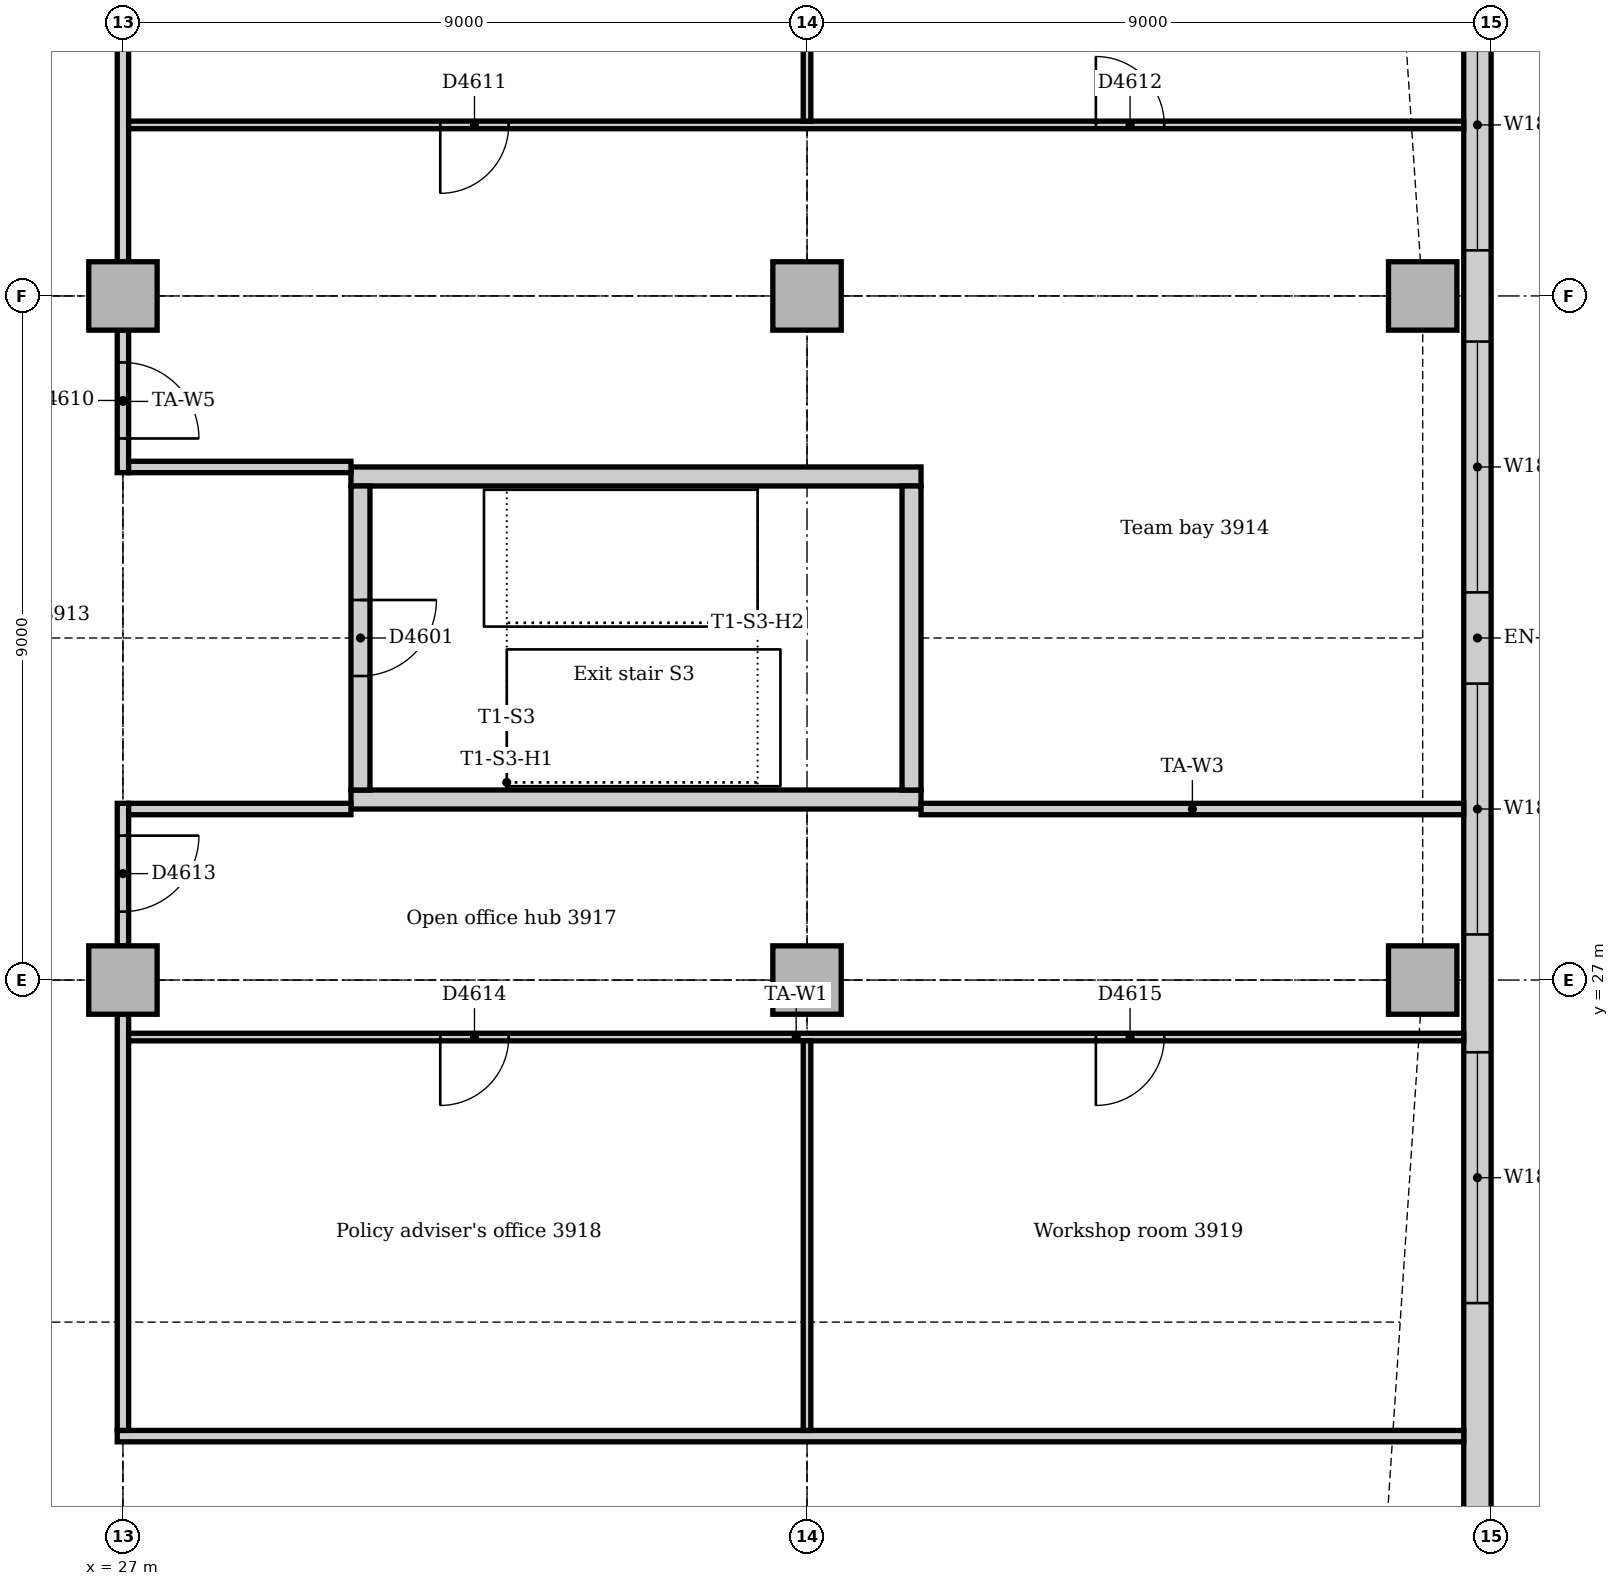
"""IFC4 building model, lengths in metres.
Left out: names, types, materials, properties, quantities, classifications, styles, units other than length and angle.
Written with IfcOpenShell. Run it as: python <this file> out.ifc"""

import sys

from ifc_helpers import new_model, si_unit, direction, frame, frame_2d, origin, origin_2d, place, context, subcontext, project, spatial, rectangle, extrude, element, fill, save


model = new_model("IFC4")
c1 = context("Model", 3, precision=1e-05, world=origin(), true_north=direction((0.0, 1.0)))
c2 = subcontext(c1, "Body", "Model", "MODEL_VIEW")
j1 = project(units=[si_unit("LENGTHUNIT", "METRE"), si_unit("PLANEANGLEUNIT", "RADIAN")], contexts=[c1])
p1 = place(None, origin())
s1 = spatial("IfcSite", under=j1, at=p1, CompositionType="ELEMENT")
p2 = place(p1, origin())
s2 = spatial("IfcBuilding", under=s1, at=p2, CompositionType="ELEMENT")
p3 = place(p2, frame((0.0, 0.0, 165.0)))
s3 = spatial("IfcBuildingStorey", under=s2, at=p3, CompositionType="ELEMENT", Elevation=165.0)
for number, where, z_axis, x_axis in (
    (1, (30.0, 29.375, 0.0), (0.0, 0.0, 1.0), (1.0, 0.0, 0.0)),
    (2, (37.5, 33.625, 0.0), (0.0, 0.0, 1.0), (-1.0, 0.0, 0.0)),
):
    element("IfcWall", number, at=place(p3, frame(where, z_axis=z_axis, x_axis=x_axis)), inside=s3, PredefinedType="SOLIDWALL", context=c2, shape_type="SweptSolid", body=[
        extrude(rectangle(XDim=7.5, YDim=0.25, at=frame_2d((3.75, 0.0))), origin(), (0.0, 0.0, 1.0), 4.0),
    ])
p4 = place(p3, frame((37.375, 29.5, 0.0), z_axis=(0.0, 0.0, 1.0), x_axis=(0.0, 1.0, 0.0)))
e3 = element("IfcWall", 3, at=p4, inside=s3, PredefinedType="SOLIDWALL", context=c2, shape_type="SweptSolid", body=[
    extrude(rectangle(XDim=4.0, YDim=0.25, at=frame_2d((2.0, 0.0))), origin(), (0.0, 0.0, 1.0), 4.0),
])
p5 = place(p3, frame((30.125, 33.5, 0.0), z_axis=(0.0, 0.0, 1.0), x_axis=(0.0, -1.0, 0.0)))
e4 = element("IfcWall", 4, at=p5, inside=s3, PredefinedType="SOLIDWALL", context=c2, shape_type="SweptSolid", body=[
    extrude(rectangle(XDim=4.0, YDim=0.25, at=frame_2d((2.0, 0.0))), origin(), (0.0, 0.0, 1.0), 4.0),
])
p6 = place(p5, frame((1.5, 0.0, 0.0)))
e5 = element("IfcOpeningElement", 5, at=p6, cuts=e4, PredefinedType="OPENING", context=c2, shape_type="SweptSolid", body=[
    extrude(rectangle(XDim=1.0, YDim=2.1, at=frame_2d((0.5, 1.05))), frame((0.0, 0.135, 0.0), z_axis=(0.0, -1.0, 0.0), x_axis=(1.0, 0.0, 0.0)), (0.0, 0.0, 1.0), 0.27),
])
for number, where, z_axis, x_axis in (
    (6, (44.1, 27.0, 0.0), (0.0, 0.0, 1.0), (1.0, 0.0, 0.0)),
    (7, (44.1, 36.0, 0.0), (0.0, 0.0, 1.0), (1.0, 0.0, 0.0)),
    (8, (27.0, 27.0, 0.0), (0.0, 0.0, 1.0), (1.0, 0.0, 0.0)),
    (9, (27.0, 36.0, 0.0), (0.0, 0.0, 1.0), (1.0, 0.0, 0.0)),
    (10, (36.0, 27.0, 0.0), (0.0, 0.0, 1.0), (1.0, 0.0, 0.0)),
    (11, (36.0, 36.0, 0.0), (0.0, 0.0, 1.0), (1.0, 0.0, 0.0)),
):
    element("IfcColumn", number, at=place(p3, frame(where, z_axis=z_axis, x_axis=x_axis)), inside=s3, PredefinedType="COLUMN", context=c2, shape_type="SweptSolid", body=[
        extrude(rectangle(XDim=0.9, YDim=0.9, at=origin_2d()), origin(), (0.0, 0.0, 1.0), 3.85),
    ])
p7 = place(p3, frame((44.82, 19.243, 0.0), z_axis=(0.0, 0.0, 1.0), x_axis=(0.0, 1.0, 0.0)))
e12 = element("IfcWall", 12, at=p7, inside=s3, PredefinedType="STANDARD", context=c2, shape_type="SweptSolid", body=[
    extrude(rectangle(XDim=24.515, YDim=0.36, at=frame_2d((12.257, 0.0))), origin(), (0.0, 0.0, 1.0), 3.85),
])
p8 = place(p7, frame((3.507, 0.0, 0.9)))
e13 = element("IfcOpeningElement", 13, at=p8, cuts=e12, PredefinedType="OPENING", context=c2, shape_type="SweptSolid", body=[
    extrude(rectangle(XDim=3.3, YDim=1.6, at=frame_2d((1.65, 0.8))), frame((0.0, 0.19, 0.0), z_axis=(0.0, -1.0, 0.0), x_axis=(1.0, 0.0, 0.0)), (0.0, 0.0, 1.0), 0.38),
])
p9 = place(p7, frame((8.357, 0.0, 0.9)))
e14 = element("IfcOpeningElement", 14, at=p9, cuts=e12, PredefinedType="OPENING", context=c2, shape_type="SweptSolid", body=[
    extrude(rectangle(XDim=3.3, YDim=1.6, at=frame_2d((1.65, 0.8))), frame((0.0, 0.19, 0.0), z_axis=(0.0, -1.0, 0.0), x_axis=(1.0, 0.0, 0.0)), (0.0, 0.0, 1.0), 0.38),
])
p10 = place(p7, frame((12.857, 0.0, 0.9)))
e15 = element("IfcOpeningElement", 15, at=p10, cuts=e12, PredefinedType="OPENING", context=c2, shape_type="SweptSolid", body=[
    extrude(rectangle(XDim=3.3, YDim=1.6, at=frame_2d((1.65, 0.8))), frame((0.0, 0.19, 0.0), z_axis=(0.0, -1.0, 0.0), x_axis=(1.0, 0.0, 0.0)), (0.0, 0.0, 1.0), 0.38),
])
p11 = place(p7, frame((17.357, 0.0, 0.9)))
e16 = element("IfcOpeningElement", 16, at=p11, cuts=e12, PredefinedType="OPENING", context=c2, shape_type="SweptSolid", body=[
    extrude(rectangle(XDim=3.3, YDim=1.6, at=frame_2d((1.65, 0.8))), frame((0.0, 0.19, 0.0), z_axis=(0.0, -1.0, 0.0), x_axis=(1.0, 0.0, 0.0)), (0.0, 0.0, 1.0), 0.38),
])
p12 = place(p3, frame((26.925, 21.0, 0.0), z_axis=(0.0, 0.0, 1.0), x_axis=(1.0, 0.0, 0.0)))
e17 = element("IfcWall", 17, at=p12, inside=s3, PredefinedType="PARTITIONING", context=c2, shape_type="SweptSolid", body=[
    extrude(rectangle(XDim=17.715, YDim=0.15, at=frame_2d((8.857, 0.0))), origin(), (0.0, 0.0, 1.0), 3.85),
])
p13 = place(p3, frame((27.0, 33.675, 0.0), z_axis=(0.0, 0.0, 1.0), x_axis=(0.0, 1.0, 0.0)))
e18 = element("IfcWall", 18, at=p13, inside=s3, PredefinedType="PARTITIONING", context=c2, shape_type="SweptSolid", body=[
    extrude(rectangle(XDim=1.875, YDim=0.15, at=frame_2d((0.938, 0.0))), origin(), (0.0, 0.0, 1.0), 3.362),
])
p14 = place(p13, frame((0.45, 0.0, 0.0)))
e19 = element("IfcOpeningElement", 19, at=p14, cuts=e18, PredefinedType="OPENING", context=c2, shape_type="SweptSolid", body=[
    extrude(rectangle(XDim=1.0, YDim=2.1, at=frame_2d((0.5, 1.05))), frame((0.0, 0.085, 0.0), z_axis=(0.0, -1.0, 0.0), x_axis=(1.0, 0.0, 0.0)), (0.0, 0.0, 1.0), 0.17),
])
p15 = place(p3, frame((27.0, 36.45, 0.0), z_axis=(0.0, 0.0, 1.0), x_axis=(0.0, 1.0, 0.0)))
e20 = element("IfcWall", 20, at=p15, inside=s3, PredefinedType="PARTITIONING", context=c2, shape_type="SweptSolid", body=[
    extrude(rectangle(XDim=7.2, YDim=0.15, at=frame_2d((3.6, 0.0))), origin(), (0.0, 0.0, 1.0), 3.362),
])
p16 = place(p3, frame((27.0, 21.075, 0.0), z_axis=(0.0, 0.0, 1.0), x_axis=(0.0, 1.0, 0.0)))
e21 = element("IfcWall", 21, at=p16, inside=s3, PredefinedType="PARTITIONING", context=c2, shape_type="SweptSolid", body=[
    extrude(rectangle(XDim=5.475, YDim=0.15, at=frame_2d((2.737, 0.0))), origin(), (0.0, 0.0, 1.0), 3.362),
])
p17 = place(p3, frame((27.0, 27.45, 0.0), z_axis=(0.0, 0.0, 1.0), x_axis=(0.0, 1.0, 0.0)))
e22 = element("IfcWall", 22, at=p17, inside=s3, PredefinedType="PARTITIONING", context=c2, shape_type="SweptSolid", body=[
    extrude(rectangle(XDim=1.875, YDim=0.15, at=frame_2d((0.938, 0.0))), origin(), (0.0, 0.0, 1.0), 3.362),
])
p18 = place(p17, frame((0.45, 0.0, 0.0)))
e23 = element("IfcOpeningElement", 23, at=p18, cuts=e22, PredefinedType="OPENING", context=c2, shape_type="SweptSolid", body=[
    extrude(rectangle(XDim=1.0, YDim=2.1, at=frame_2d((0.5, 1.05))), frame((0.0, 0.085, 0.0), z_axis=(0.0, -1.0, 0.0), x_axis=(1.0, 0.0, 0.0)), (0.0, 0.0, 1.0), 0.17),
])
for number, where, z_axis, x_axis in (
    (24, (27.075, 29.25, 0.0), (0.0, 0.0, 1.0), (1.0, 0.0, 0.0)),
    (25, (27.075, 33.75, 0.0), (0.0, 0.0, 1.0), (1.0, 0.0, 0.0)),
):
    element("IfcWall", number, at=place(p3, frame(where, z_axis=z_axis, x_axis=x_axis)), inside=s3, PredefinedType="PARTITIONING", context=c2, shape_type="SweptSolid", body=[
        extrude(rectangle(XDim=2.925, YDim=0.15, at=frame_2d((1.462, 0.0))), origin(), (0.0, 0.0, 1.0), 3.85),
    ])
p19 = place(p3, frame((37.5, 29.25, 0.0), z_axis=(0.0, 0.0, 1.0), x_axis=(1.0, 0.0, 0.0)))
e26 = element("IfcWall", 26, at=p19, inside=s3, PredefinedType="PARTITIONING", context=c2, shape_type="SweptSolid", body=[
    extrude(rectangle(XDim=7.14, YDim=0.15, at=frame_2d((3.57, 0.0))), origin(), (0.0, 0.0, 1.0), 3.85),
])
p20 = place(p3, frame((27.075, 26.25, 0.0), z_axis=(0.0, 0.0, 1.0), x_axis=(1.0, 0.0, 0.0)))
e27 = element("IfcWall", 27, at=p20, inside=s3, PredefinedType="PARTITIONING", context=c2, shape_type="SweptSolid", body=[
    extrude(rectangle(XDim=17.565, YDim=0.1, at=frame_2d((8.783, 0.0))), origin(), (0.0, 0.0, 1.0), 3.85),
])
p21 = place(p20, frame((4.1, 0.0, 0.0)))
e28 = element("IfcOpeningElement", 28, at=p21, cuts=e27, PredefinedType="OPENING", context=c2, shape_type="SweptSolid", body=[
    extrude(rectangle(XDim=0.9, YDim=2.1, at=frame_2d((0.45, 1.05))), frame((0.0, 0.06, 0.0), z_axis=(0.0, -1.0, 0.0), x_axis=(1.0, 0.0, 0.0)), (0.0, 0.0, 1.0), 0.12),
])
p22 = place(p20, frame((12.725, 0.0, 0.0)))
e29 = element("IfcOpeningElement", 29, at=p22, cuts=e27, PredefinedType="OPENING", context=c2, shape_type="SweptSolid", body=[
    extrude(rectangle(XDim=0.9, YDim=2.1, at=frame_2d((0.45, 1.05))), frame((0.0, 0.06, 0.0), z_axis=(0.0, -1.0, 0.0), x_axis=(1.0, 0.0, 0.0)), (0.0, 0.0, 1.0), 0.12),
])
p23 = place(p3, frame((27.075, 38.25, 0.0), z_axis=(0.0, 0.0, 1.0), x_axis=(1.0, 0.0, 0.0)))
e30 = element("IfcWall", 30, at=p23, inside=s3, PredefinedType="PARTITIONING", context=c2, shape_type="SweptSolid", body=[
    extrude(rectangle(XDim=17.565, YDim=0.1, at=frame_2d((8.783, 0.0))), origin(), (0.0, 0.0, 1.0), 3.85),
])
p24 = place(p23, frame((4.1, 0.0, 0.0)))
e31 = element("IfcOpeningElement", 31, at=p24, cuts=e30, PredefinedType="OPENING", context=c2, shape_type="SweptSolid", body=[
    extrude(rectangle(XDim=0.9, YDim=2.1, at=frame_2d((0.45, 1.05))), frame((0.0, 0.06, 0.0), z_axis=(0.0, -1.0, 0.0), x_axis=(1.0, 0.0, 0.0)), (0.0, 0.0, 1.0), 0.12),
])
p25 = place(p23, frame((12.725, 0.0, 0.0)))
e32 = element("IfcOpeningElement", 32, at=p25, cuts=e30, PredefinedType="OPENING", context=c2, shape_type="SweptSolid", body=[
    extrude(rectangle(XDim=0.9, YDim=2.1, at=frame_2d((0.45, 1.05))), frame((0.0, 0.06, 0.0), z_axis=(0.0, -1.0, 0.0), x_axis=(1.0, 0.0, 0.0)), (0.0, 0.0, 1.0), 0.12),
])
p26 = place(p3, frame((36.0, 38.3, 0.0), z_axis=(0.0, 0.0, 1.0), x_axis=(0.0, 1.0, 0.0)))
e33 = element("IfcWall", 33, at=p26, inside=s3, PredefinedType="PARTITIONING", context=c2, shape_type="SweptSolid", body=[
    extrude(rectangle(XDim=5.35, YDim=0.1, at=frame_2d((2.675, 0.0))), origin(), (0.0, 0.0, 1.0), 3.362),
])
p27 = place(p3, frame((36.0, 21.075, 0.0), z_axis=(0.0, 0.0, 1.0), x_axis=(0.0, 1.0, 0.0)))
e34 = element("IfcWall", 34, at=p27, inside=s3, PredefinedType="PARTITIONING", context=c2, shape_type="SweptSolid", body=[
    extrude(rectangle(XDim=5.125, YDim=0.1, at=frame_2d((2.562, 0.0))), origin(), (0.0, 0.0, 1.0), 3.362),
])
p28 = place(p8, origin())
e35 = element("IfcWindow", 35, at=p28, inside=s3, PartitioningType="SINGLE_PANEL", PredefinedType="WINDOW", context=c2, shape_type="SweptSolid", body=[
    extrude(rectangle(XDim=3.3, YDim=1.6, at=frame_2d((1.65, 0.8))), frame((0.0, 0.13, 0.0), z_axis=(0.0, -1.0, 0.0), x_axis=(1.0, 0.0, 0.0)), (0.0, 0.0, 1.0), 0.06),
])
fill(e13, e35)
p29 = place(p9, origin())
e36 = element("IfcWindow", 36, at=p29, inside=s3, PartitioningType="SINGLE_PANEL", PredefinedType="WINDOW", context=c2, shape_type="SweptSolid", body=[
    extrude(rectangle(XDim=3.3, YDim=1.6, at=frame_2d((1.65, 0.8))), frame((0.0, 0.13, 0.0), z_axis=(0.0, -1.0, 0.0), x_axis=(1.0, 0.0, 0.0)), (0.0, 0.0, 1.0), 0.06),
])
fill(e14, e36)
p30 = place(p10, origin())
e37 = element("IfcWindow", 37, at=p30, inside=s3, PartitioningType="SINGLE_PANEL", PredefinedType="WINDOW", context=c2, shape_type="SweptSolid", body=[
    extrude(rectangle(XDim=3.3, YDim=1.6, at=frame_2d((1.65, 0.8))), frame((0.0, 0.13, 0.0), z_axis=(0.0, -1.0, 0.0), x_axis=(1.0, 0.0, 0.0)), (0.0, 0.0, 1.0), 0.06),
])
fill(e15, e37)
p31 = place(p11, origin())
e38 = element("IfcWindow", 38, at=p31, inside=s3, PartitioningType="SINGLE_PANEL", PredefinedType="WINDOW", context=c2, shape_type="SweptSolid", body=[
    extrude(rectangle(XDim=3.3, YDim=1.6, at=frame_2d((1.65, 0.8))), frame((0.0, 0.13, 0.0), z_axis=(0.0, -1.0, 0.0), x_axis=(1.0, 0.0, 0.0)), (0.0, 0.0, 1.0), 0.06),
])
fill(e16, e38)
p32 = place(p6, origin())
e39 = element("IfcDoor", 39, at=p32, inside=s3, OperationType="SINGLE_SWING_LEFT", PredefinedType="DOOR", context=c2, shape_type="SweptSolid", body=[
    extrude(rectangle(XDim=1.0, YDim=2.1, at=frame_2d((0.5, 1.05))), frame((0.0, 0.025, 0.0), z_axis=(0.0, -1.0, 0.0), x_axis=(1.0, 0.0, 0.0)), (0.0, 0.0, 1.0), 0.05),
])
fill(e5, e39)
p33 = place(p14, frame((1.0, 0.0, 0.0), z_axis=(0.0, 0.0, 1.0), x_axis=(-1.0, 0.0, 0.0)))
e40 = element("IfcDoor", 40, at=p33, inside=s3, OperationType="SINGLE_SWING_RIGHT", PredefinedType="DOOR", context=c2, shape_type="SweptSolid", body=[
    extrude(rectangle(XDim=1.0, YDim=2.1, at=frame_2d((0.5, 1.05))), frame((0.0, 0.025, 0.0), z_axis=(0.0, -1.0, 0.0), x_axis=(1.0, 0.0, 0.0)), (0.0, 0.0, 1.0), 0.05),
])
fill(e19, e40)
p34 = place(p24, frame((0.9, 0.0, 0.0), z_axis=(0.0, 0.0, 1.0), x_axis=(-1.0, 0.0, 0.0)))
e41 = element("IfcDoor", 41, at=p34, inside=s3, OperationType="SINGLE_SWING_RIGHT", PredefinedType="DOOR", context=c2, shape_type="SweptSolid", body=[
    extrude(rectangle(XDim=0.9, YDim=2.1, at=frame_2d((0.45, 1.05))), frame((0.0, 0.025, 0.0), z_axis=(0.0, -1.0, 0.0), x_axis=(1.0, 0.0, 0.0)), (0.0, 0.0, 1.0), 0.05),
])
fill(e31, e41)
p35 = place(p25, origin())
e42 = element("IfcDoor", 42, at=p35, inside=s3, OperationType="SINGLE_SWING_LEFT", PredefinedType="DOOR", context=c2, shape_type="SweptSolid", body=[
    extrude(rectangle(XDim=0.9, YDim=2.1, at=frame_2d((0.45, 1.05))), frame((0.0, 0.025, 0.0), z_axis=(0.0, -1.0, 0.0), x_axis=(1.0, 0.0, 0.0)), (0.0, 0.0, 1.0), 0.05),
])
fill(e32, e42)
p36 = place(p18, frame((1.0, 0.0, 0.0), z_axis=(0.0, 0.0, 1.0), x_axis=(-1.0, 0.0, 0.0)))
e43 = element("IfcDoor", 43, at=p36, inside=s3, OperationType="SINGLE_SWING_LEFT", PredefinedType="DOOR", context=c2, shape_type="SweptSolid", body=[
    extrude(rectangle(XDim=1.0, YDim=2.1, at=frame_2d((0.5, 1.05))), frame((0.0, 0.025, 0.0), z_axis=(0.0, -1.0, 0.0), x_axis=(1.0, 0.0, 0.0)), (0.0, 0.0, 1.0), 0.05),
])
fill(e23, e43)
p37 = place(p21, frame((0.9, 0.0, 0.0), z_axis=(0.0, 0.0, 1.0), x_axis=(-1.0, 0.0, 0.0)))
e44 = element("IfcDoor", 44, at=p37, inside=s3, OperationType="SINGLE_SWING_RIGHT", PredefinedType="DOOR", context=c2, shape_type="SweptSolid", body=[
    extrude(rectangle(XDim=0.9, YDim=2.1, at=frame_2d((0.45, 1.05))), frame((0.0, 0.025, 0.0), z_axis=(0.0, -1.0, 0.0), x_axis=(1.0, 0.0, 0.0)), (0.0, 0.0, 1.0), 0.05),
])
fill(e28, e44)
p38 = place(p22, frame((0.9, 0.0, 0.0), z_axis=(0.0, 0.0, 1.0), x_axis=(-1.0, 0.0, 0.0)))
e45 = element("IfcDoor", 45, at=p38, inside=s3, OperationType="SINGLE_SWING_RIGHT", PredefinedType="DOOR", context=c2, shape_type="SweptSolid", body=[
    extrude(rectangle(XDim=0.9, YDim=2.1, at=frame_2d((0.45, 1.05))), frame((0.0, 0.025, 0.0), z_axis=(0.0, -1.0, 0.0), x_axis=(1.0, 0.0, 0.0)), (0.0, 0.0, 1.0), 0.05),
])
fill(e29, e45)
save(model, sys.argv[1])
